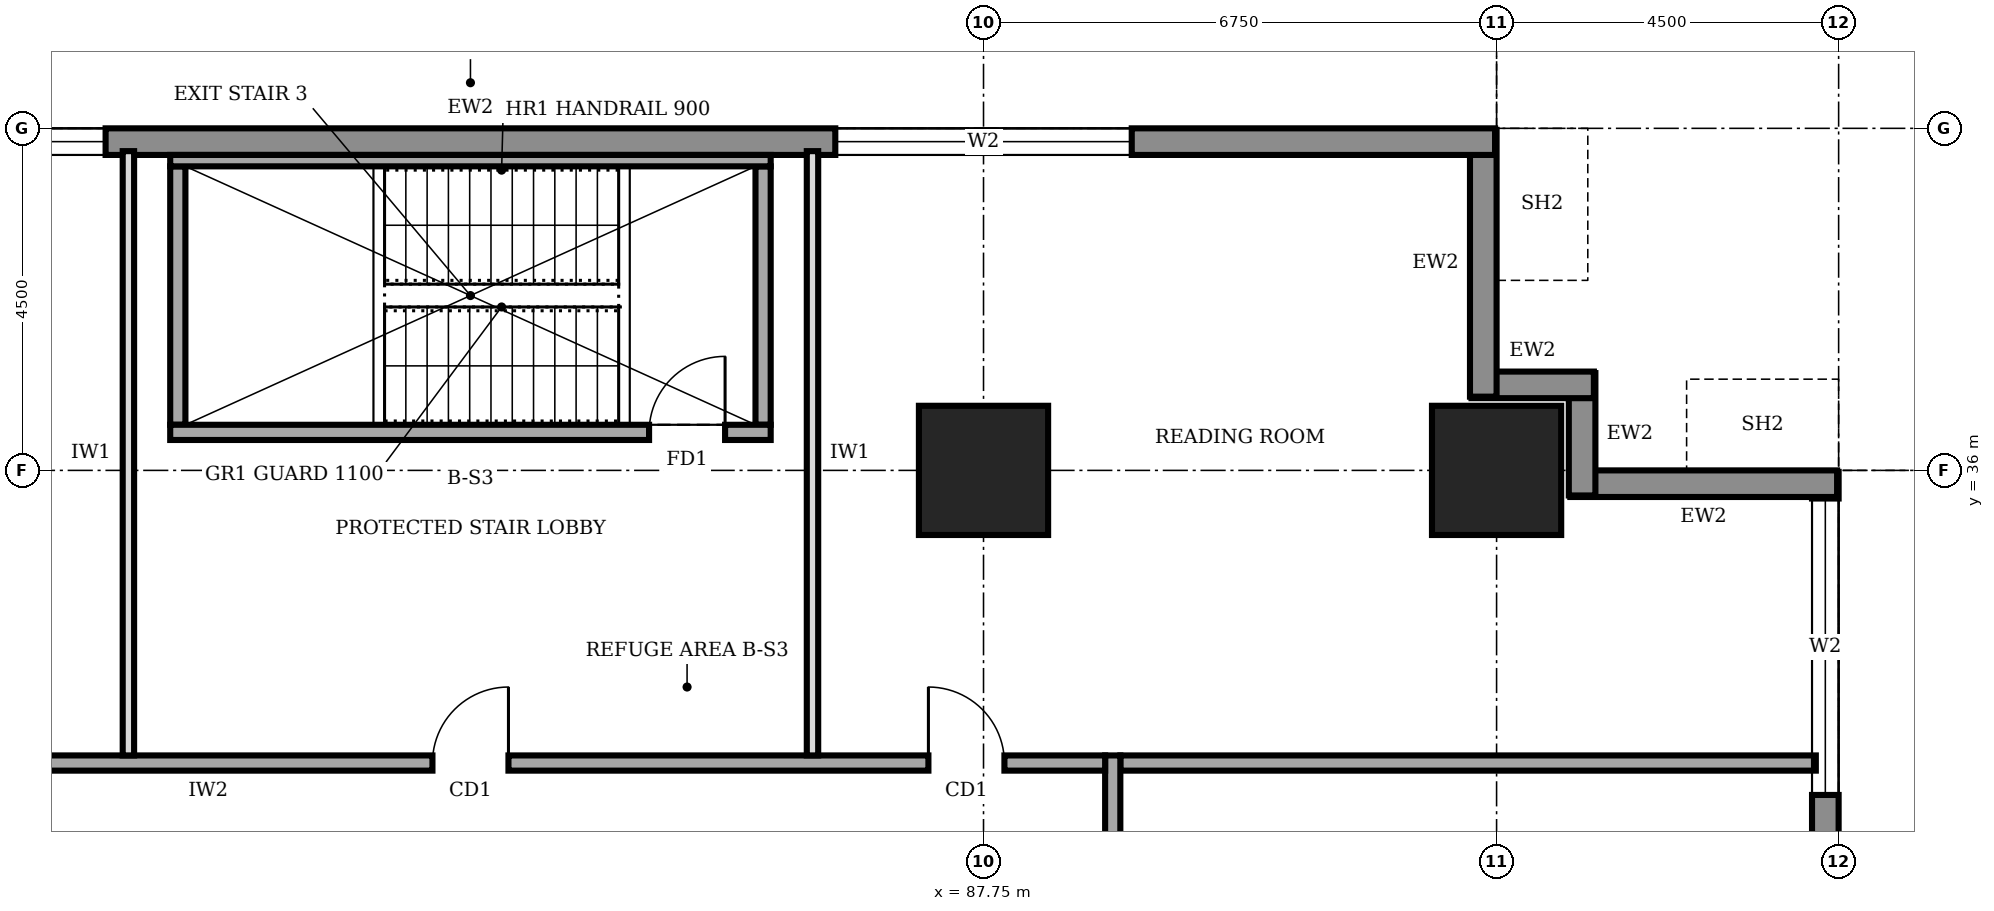
"""IFC4 building model, lengths in metres.
Left out: names, types, materials, properties, quantities, classifications, styles, units other than length and angle.
Written with IfcOpenShell. Run it as: python <this file> out.ifc"""

import sys

from ifc_helpers import new_model, si_unit, direction, frame, frame_2d, origin, origin_2d, place, context, subcontext, project, spatial, rectangle, extrude, element, fill, save


model = new_model("IFC4")
c1 = context("Model", 3, precision=1e-05, world=origin(), true_north=direction((0.0, 1.0)))
c2 = subcontext(c1, "Body", "Model", "MODEL_VIEW")
j1 = project(units=[si_unit("LENGTHUNIT", "METRE"), si_unit("PLANEANGLEUNIT", "RADIAN")], contexts=[c1])
p1 = place(None, origin())
s1 = spatial("IfcSite", under=j1, at=p1, CompositionType="ELEMENT")
p2 = place(p1, origin())
s2 = spatial("IfcBuilding", under=s1, at=p2, CompositionType="ELEMENT")
p3 = place(p2, frame((0.0, 0.0, 57.0)))
s3 = spatial("IfcBuildingStorey", under=s2, at=p3, CompositionType="ELEMENT", Elevation=57.0)
for number, where, z_axis, x_axis in (
    (1, (87.75, 36.0, 0.0), (0.0, 0.0, 1.0), (1.0, 0.0, 0.0)),
    (2, (94.5, 36.0, 0.0), (0.0, 0.0, 1.0), (1.0, 0.0, 0.0)),
):
    element("IfcColumn", number, at=place(p3, frame(where, z_axis=z_axis, x_axis=x_axis)), inside=s3, PredefinedType="COLUMN", context=c2, shape_type="SweptSolid", body=[
        extrude(rectangle(XDim=1.7, YDim=1.7, at=origin_2d()), origin(), (0.0, 0.0, 1.0), 4.0),
    ])
p4 = place(p3, frame((98.825, 4.52, 0.0), z_axis=(0.0, 0.0, 1.0), x_axis=(0.0, 1.0, 0.0)))
e3 = element("IfcWall", 3, at=p4, inside=s3, PredefinedType="STANDARD", context=c2, shape_type="SweptSolid", body=[
    extrude(rectangle(XDim=31.46, YDim=0.35, at=frame_2d((15.73, 0.0))), origin(), (0.0, 0.0, 1.0), 3.75),
])
p5 = place(p4, frame((4.78, 0.0, 0.6)))
e4 = element("IfcOpeningElement", 4, at=p5, cuts=e3, PredefinedType="OPENING", context=c2, shape_type="SweptSolid", body=[
    extrude(rectangle(XDim=3.9, YDim=2.6, at=frame_2d((1.95, 1.3))), frame((0.0, 0.185, 0.0), z_axis=(0.0, -1.0, 0.0), x_axis=(1.0, 0.0, 0.0)), (0.0, 0.0, 1.0), 0.37),
])
p6 = place(p4, frame((9.28, 0.0, 0.6)))
e5 = element("IfcOpeningElement", 5, at=p6, cuts=e3, PredefinedType="OPENING", context=c2, shape_type="SweptSolid", body=[
    extrude(rectangle(XDim=3.9, YDim=2.6, at=frame_2d((1.95, 1.3))), frame((0.0, 0.185, 0.0), z_axis=(0.0, -1.0, 0.0), x_axis=(1.0, 0.0, 0.0)), (0.0, 0.0, 1.0), 0.37),
])
p7 = place(p4, frame((13.78, 0.0, 0.6)))
e6 = element("IfcOpeningElement", 6, at=p7, cuts=e3, PredefinedType="OPENING", context=c2, shape_type="SweptSolid", body=[
    extrude(rectangle(XDim=3.9, YDim=2.6, at=frame_2d((1.95, 1.3))), frame((0.0, 0.185, 0.0), z_axis=(0.0, -1.0, 0.0), x_axis=(1.0, 0.0, 0.0)), (0.0, 0.0, 1.0), 0.37),
])
p8 = place(p4, frame((18.28, 0.0, 0.6)))
e7 = element("IfcOpeningElement", 7, at=p8, cuts=e3, PredefinedType="OPENING", context=c2, shape_type="SweptSolid", body=[
    extrude(rectangle(XDim=3.9, YDim=2.6, at=frame_2d((1.95, 1.3))), frame((0.0, 0.185, 0.0), z_axis=(0.0, -1.0, 0.0), x_axis=(1.0, 0.0, 0.0)), (0.0, 0.0, 1.0), 0.37),
])
p9 = place(p4, frame((22.78, 0.0, 0.6)))
e8 = element("IfcOpeningElement", 8, at=p9, cuts=e3, PredefinedType="OPENING", context=c2, shape_type="SweptSolid", body=[
    extrude(rectangle(XDim=3.9, YDim=2.6, at=frame_2d((1.95, 1.3))), frame((0.0, 0.185, 0.0), z_axis=(0.0, -1.0, 0.0), x_axis=(1.0, 0.0, 0.0)), (0.0, 0.0, 1.0), 0.37),
])
p10 = place(p4, frame((27.21, 0.0, 0.6)))
e9 = element("IfcOpeningElement", 9, at=p10, cuts=e3, PredefinedType="OPENING", context=c2, shape_type="SweptSolid", body=[
    extrude(rectangle(XDim=3.9, YDim=2.6, at=frame_2d((1.95, 1.3))), frame((0.0, 0.185, 0.0), z_axis=(0.0, -1.0, 0.0), x_axis=(1.0, 0.0, 0.0)), (0.0, 0.0, 1.0), 0.37),
])
p11 = place(p3, frame((98.98, 35.825, 0.0), z_axis=(0.0, 0.0, 1.0), x_axis=(-1.0, 0.0, 0.0)))
e10 = element("IfcWall", 10, at=p11, inside=s3, PredefinedType="STANDARD", context=c2, shape_type="SweptSolid", body=[
    extrude(rectangle(XDim=3.51, YDim=0.35, at=frame_2d((1.755, 0.0))), origin(), (0.0, 0.0, 1.0), 2.85),
])
for number, where, z_axis, x_axis in (
    (11, (95.625, 35.67, 0.0), (0.0, 0.0, 1.0), (0.0, 1.0, 0.0)),
    (12, (95.78, 37.125, 0.0), (0.0, 0.0, 1.0), (-1.0, 0.0, 0.0)),
):
    element("IfcWall", number, at=place(p3, frame(where, z_axis=z_axis, x_axis=x_axis)), inside=s3, PredefinedType="STANDARD", context=c2, shape_type="SweptSolid", body=[
        extrude(rectangle(XDim=1.61, YDim=0.35, at=frame_2d((0.805, 0.0))), origin(), (0.0, 0.0, 1.0), 3.75),
    ])
p12 = place(p3, frame((94.325, 36.97, 0.0), z_axis=(0.0, 0.0, 1.0), x_axis=(0.0, 1.0, 0.0)))
e13 = element("IfcWall", 13, at=p12, inside=s3, PredefinedType="STANDARD", context=c2, shape_type="SweptSolid", body=[
    extrude(rectangle(XDim=3.51, YDim=0.35, at=frame_2d((1.755, 0.0))), origin(), (0.0, 0.0, 1.0), 2.85),
])
p13 = place(p3, frame((94.48, 40.325, 0.0), z_axis=(0.0, 0.0, 1.0), x_axis=(-1.0, 0.0, 0.0)))
e14 = element("IfcWall", 14, at=p13, inside=s3, PredefinedType="STANDARD", context=c2, shape_type="SweptSolid", body=[
    extrude(rectangle(XDim=26.96, YDim=0.35, at=frame_2d((13.48, 0.0))), origin(), (0.0, 0.0, 1.0), 3.75),
])
p14 = place(p13, frame((22.71, 0.0, 0.6)))
e15 = element("IfcOpeningElement", 15, at=p14, cuts=e14, PredefinedType="OPENING", context=c2, shape_type="SweptSolid", body=[
    extrude(rectangle(XDim=3.9, YDim=2.6, at=frame_2d((1.95, 1.3))), frame((0.0, 0.185, 0.0), z_axis=(0.0, -1.0, 0.0), x_axis=(1.0, 0.0, 0.0)), (0.0, 0.0, 1.0), 0.37),
])
p15 = place(p13, frame((18.28, 0.0, 0.6)))
e16 = element("IfcOpeningElement", 16, at=p15, cuts=e14, PredefinedType="OPENING", context=c2, shape_type="SweptSolid", body=[
    extrude(rectangle(XDim=3.9, YDim=2.6, at=frame_2d((1.95, 1.3))), frame((0.0, 0.185, 0.0), z_axis=(0.0, -1.0, 0.0), x_axis=(1.0, 0.0, 0.0)), (0.0, 0.0, 1.0), 0.37),
])
p16 = place(p13, frame((4.78, 0.0, 0.6)))
e17 = element("IfcOpeningElement", 17, at=p16, cuts=e14, PredefinedType="OPENING", context=c2, shape_type="SweptSolid", body=[
    extrude(rectangle(XDim=3.9, YDim=2.6, at=frame_2d((1.95, 1.3))), frame((0.0, 0.185, 0.0), z_axis=(0.0, -1.0, 0.0), x_axis=(1.0, 0.0, 0.0)), (0.0, 0.0, 1.0), 0.37),
])
p17 = place(p3, frame((89.45, 9.2, 0.0), z_axis=(0.0, 0.0, 1.0), x_axis=(0.0, 1.0, 0.0)))
e18 = element("IfcWall", 18, at=p17, inside=s3, PredefinedType="SOLIDWALL", context=c2, shape_type="SweptSolid", body=[
    extrude(rectangle(XDim=23.05, YDim=0.2, at=frame_2d((11.525, 0.0))), origin(), (0.0, 0.0, 1.0), 3.75),
])
p18 = place(p17, frame((1.55, 0.0, 0.0)))
e19 = element("IfcOpeningElement", 19, at=p18, cuts=e18, PredefinedType="OPENING", context=c2, shape_type="SweptSolid", body=[
    extrude(rectangle(XDim=1.0, YDim=2.1, at=frame_2d((0.5, 1.05))), frame((0.0, 0.11, 0.0), z_axis=(0.0, -1.0, 0.0), x_axis=(1.0, 0.0, 0.0)), (0.0, 0.0, 1.0), 0.22),
])
p19 = place(p17, frame((5.75, 0.0, 0.0)))
e20 = element("IfcOpeningElement", 20, at=p19, cuts=e18, PredefinedType="OPENING", context=c2, shape_type="SweptSolid", body=[
    extrude(rectangle(XDim=0.9, YDim=2.1, at=frame_2d((0.45, 1.05))), frame((0.0, 0.11, 0.0), z_axis=(0.0, -1.0, 0.0), x_axis=(1.0, 0.0, 0.0)), (0.0, 0.0, 1.0), 0.22),
])
p20 = place(p17, frame((8.75, 0.0, 0.0)))
e21 = element("IfcOpeningElement", 21, at=p20, cuts=e18, PredefinedType="OPENING", context=c2, shape_type="SweptSolid", body=[
    extrude(rectangle(XDim=0.9, YDim=2.1, at=frame_2d((0.45, 1.05))), frame((0.0, 0.11, 0.0), z_axis=(0.0, -1.0, 0.0), x_axis=(1.0, 0.0, 0.0)), (0.0, 0.0, 1.0), 0.22),
])
p21 = place(p17, frame((13.6, 0.0, 0.0)))
e22 = element("IfcOpeningElement", 22, at=p21, cuts=e18, PredefinedType="OPENING", context=c2, shape_type="SweptSolid", body=[
    extrude(rectangle(XDim=0.9, YDim=2.1, at=frame_2d((0.45, 1.05))), frame((0.0, 0.11, 0.0), z_axis=(0.0, -1.0, 0.0), x_axis=(1.0, 0.0, 0.0)), (0.0, 0.0, 1.0), 0.22),
])
p22 = place(p17, frame((16.3, 0.0, 0.0)))
e23 = element("IfcOpeningElement", 23, at=p22, cuts=e18, PredefinedType="OPENING", context=c2, shape_type="SweptSolid", body=[
    extrude(rectangle(XDim=1.0, YDim=2.1, at=frame_2d((0.5, 1.05))), frame((0.0, 0.11, 0.0), z_axis=(0.0, -1.0, 0.0), x_axis=(1.0, 0.0, 0.0)), (0.0, 0.0, 1.0), 0.22),
])
p23 = place(p17, frame((10.8, 0.0, 0.0)))
e24 = element("IfcOpeningElement", 24, at=p23, cuts=e18, PredefinedType="OPENING", context=c2, shape_type="SweptSolid", body=[
    extrude(rectangle(XDim=1.0, YDim=2.1, at=frame_2d((0.5, 1.05))), frame((0.0, 0.11, 0.0), z_axis=(0.0, -1.0, 0.0), x_axis=(1.0, 0.0, 0.0)), (0.0, 0.0, 1.0), 0.22),
])
p24 = place(p17, frame((19.925, 0.0, 0.0)))
e25 = element("IfcOpeningElement", 25, at=p24, cuts=e18, PredefinedType="OPENING", context=c2, shape_type="SweptSolid", body=[
    extrude(rectangle(XDim=1.0, YDim=2.1, at=frame_2d((0.5, 1.05))), frame((0.0, 0.11, 0.0), z_axis=(0.0, -1.0, 0.0), x_axis=(1.0, 0.0, 0.0)), (0.0, 0.0, 1.0), 0.22),
])
p25 = place(p3, frame((89.35, 32.15, 0.0), z_axis=(0.0, 0.0, 1.0), x_axis=(-1.0, 0.0, 0.0)))
e26 = element("IfcWall", 26, at=p25, inside=s3, PredefinedType="SOLIDWALL", context=c2, shape_type="SweptSolid", body=[
    extrude(rectangle(XDim=17.65, YDim=0.2, at=frame_2d((8.825, 0.0))), origin(), (0.0, 0.0, 1.0), 3.75),
])
p26 = place(p25, frame((14.75, 0.0, 0.0)))
e27 = element("IfcOpeningElement", 27, at=p26, cuts=e26, PredefinedType="OPENING", context=c2, shape_type="SweptSolid", body=[
    extrude(rectangle(XDim=1.0, YDim=2.1, at=frame_2d((0.5, 1.05))), frame((0.0, 0.11, 0.0), z_axis=(0.0, -1.0, 0.0), x_axis=(1.0, 0.0, 0.0)), (0.0, 0.0, 1.0), 0.22),
])
p27 = place(p25, frame((7.85, 0.0, 0.0)))
e28 = element("IfcOpeningElement", 28, at=p27, cuts=e26, PredefinedType="OPENING", context=c2, shape_type="SweptSolid", body=[
    extrude(rectangle(XDim=1.0, YDim=2.1, at=frame_2d((0.5, 1.05))), frame((0.0, 0.11, 0.0), z_axis=(0.0, -1.0, 0.0), x_axis=(1.0, 0.0, 0.0)), (0.0, 0.0, 1.0), 0.22),
])
p28 = place(p25, frame((1.325, 0.0, 0.0)))
e29 = element("IfcOpeningElement", 29, at=p28, cuts=e26, PredefinedType="OPENING", context=c2, shape_type="SweptSolid", body=[
    extrude(rectangle(XDim=1.0, YDim=2.1, at=frame_2d((0.5, 1.05))), frame((0.0, 0.11, 0.0), z_axis=(0.0, -1.0, 0.0), x_axis=(1.0, 0.0, 0.0)), (0.0, 0.0, 1.0), 0.22),
])
p29 = place(p3, frame((89.55, 32.15, 0.0), z_axis=(0.0, 0.0, 1.0), x_axis=(1.0, 0.0, 0.0)))
e30 = element("IfcWall", 30, at=p29, inside=s3, PredefinedType="SOLIDWALL", context=c2, shape_type="SweptSolid", body=[
    extrude(rectangle(XDim=9.15, YDim=0.2, at=frame_2d((4.575, 0.0))), origin(), (0.0, 0.0, 1.0), 3.75),
])
for number, where, z_axis, x_axis in (
    (31, (76.5, 32.25, 0.0), (0.0, 0.0, 1.0), (0.0, 1.0, 0.0)),
    (32, (85.5, 32.25, 0.0), (0.0, 0.0, 1.0), (0.0, 1.0, 0.0)),
):
    element("IfcWall", number, at=place(p3, frame(where, z_axis=z_axis, x_axis=x_axis)), inside=s3, PredefinedType="PARTITIONING", context=c2, shape_type="SweptSolid", body=[
        extrude(rectangle(XDim=7.95, YDim=0.15, at=frame_2d((3.975, 0.0))), origin(), (0.0, 0.0, 1.0), 3.75),
    ])
p30 = place(p3, frame((77.05, 36.5, 0.0), z_axis=(0.0, 0.0, 1.0), x_axis=(1.0, 0.0, 0.0)))
e33 = element("IfcWall", 33, at=p30, inside=s3, PredefinedType="SOLIDWALL", context=c2, shape_type="SweptSolid", body=[
    extrude(rectangle(XDim=7.9, YDim=0.2, at=frame_2d((3.95, 0.0))), origin(), (0.0, 0.0, 1.0), 3.75),
])
p31 = place(p30, frame((6.3, 0.0, 0.0)))
e34 = element("IfcOpeningElement", 34, at=p31, cuts=e33, PredefinedType="OPENING", context=c2, shape_type="SweptSolid", body=[
    extrude(rectangle(XDim=1.0, YDim=2.1, at=frame_2d((0.5, 1.05))), frame((0.0, 0.11, 0.0), z_axis=(0.0, -1.0, 0.0), x_axis=(1.0, 0.0, 0.0)), (0.0, 0.0, 1.0), 0.22),
])
p32 = place(p3, frame((77.05, 40.075, 0.0), z_axis=(0.0, 0.0, 1.0), x_axis=(1.0, 0.0, 0.0)))
e35 = element("IfcWall", 35, at=p32, inside=s3, PredefinedType="SOLIDWALL", context=c2, shape_type="SweptSolid", body=[
    extrude(rectangle(XDim=7.9, YDim=0.15, at=frame_2d((3.95, 0.0))), origin(), (0.0, 0.0, 1.0), 3.75),
])
for number, where, z_axis, x_axis in (
    (36, (77.15, 36.6, 0.0), (0.0, 0.0, 1.0), (0.0, 1.0, 0.0)),
    (37, (84.85, 36.6, 0.0), (0.0, 0.0, 1.0), (0.0, 1.0, 0.0)),
):
    element("IfcWall", number, at=place(p3, frame(where, z_axis=z_axis, x_axis=x_axis)), inside=s3, PredefinedType="SOLIDWALL", context=c2, shape_type="SweptSolid", body=[
        extrude(rectangle(XDim=3.4, YDim=0.2, at=frame_2d((1.7, 0.0))), origin(), (0.0, 0.0, 1.0), 3.75),
    ])
p33 = place(p10, origin())
e38 = element("IfcWindow", 38, at=p33, inside=s3, PartitioningType="SINGLE_PANEL", PredefinedType="WINDOW", context=c2, shape_type="SweptSolid", body=[
    extrude(rectangle(XDim=3.9, YDim=2.6, at=frame_2d((1.95, 1.3))), frame((0.0, 0.03, 0.0), z_axis=(0.0, -1.0, 0.0), x_axis=(1.0, 0.0, 0.0)), (0.0, 0.0, 1.0), 0.06),
])
fill(e9, e38)
p34 = place(p15, origin())
e39 = element("IfcWindow", 39, at=p34, inside=s3, PartitioningType="SINGLE_PANEL", PredefinedType="WINDOW", context=c2, shape_type="SweptSolid", body=[
    extrude(rectangle(XDim=3.9, YDim=2.6, at=frame_2d((1.95, 1.3))), frame((0.0, 0.03, 0.0), z_axis=(0.0, -1.0, 0.0), x_axis=(1.0, 0.0, 0.0)), (0.0, 0.0, 1.0), 0.06),
])
fill(e16, e39)
p35 = place(p16, origin())
e40 = element("IfcWindow", 40, at=p35, inside=s3, PartitioningType="SINGLE_PANEL", PredefinedType="WINDOW", context=c2, shape_type="SweptSolid", body=[
    extrude(rectangle(XDim=3.9, YDim=2.6, at=frame_2d((1.95, 1.3))), frame((0.0, 0.03, 0.0), z_axis=(0.0, -1.0, 0.0), x_axis=(1.0, 0.0, 0.0)), (0.0, 0.0, 1.0), 0.06),
])
fill(e17, e40)
p36 = place(p27, frame((1.0, 0.0, 0.0), z_axis=(0.0, 0.0, 1.0), x_axis=(-1.0, 0.0, 0.0)))
e41 = element("IfcDoor", 41, at=p36, inside=s3, OperationType="SINGLE_SWING_RIGHT", PredefinedType="DOOR", context=c2, shape_type="SweptSolid", body=[
    extrude(rectangle(XDim=1.0, YDim=2.1, at=frame_2d((0.5, 1.05))), frame((0.0, 0.025, 0.0), z_axis=(0.0, -1.0, 0.0), x_axis=(1.0, 0.0, 0.0)), (0.0, 0.0, 1.0), 0.05),
])
fill(e28, e41)
p37 = place(p28, frame((1.0, 0.0, 0.0), z_axis=(0.0, 0.0, 1.0), x_axis=(-1.0, 0.0, 0.0)))
e42 = element("IfcDoor", 42, at=p37, inside=s3, OperationType="SINGLE_SWING_LEFT", PredefinedType="DOOR", context=c2, shape_type="SweptSolid", body=[
    extrude(rectangle(XDim=1.0, YDim=2.1, at=frame_2d((0.5, 1.05))), frame((0.0, 0.025, 0.0), z_axis=(0.0, -1.0, 0.0), x_axis=(1.0, 0.0, 0.0)), (0.0, 0.0, 1.0), 0.05),
])
fill(e29, e42)
p38 = place(p31, origin())
e43 = element("IfcDoor", 43, at=p38, inside=s3, OperationType="SINGLE_SWING_RIGHT", PredefinedType="DOOR", context=c2, shape_type="SweptSolid", body=[
    extrude(rectangle(XDim=1.0, YDim=2.1, at=frame_2d((0.5, 1.05))), frame((0.0, 0.025, 0.0), z_axis=(0.0, -1.0, 0.0), x_axis=(1.0, 0.0, 0.0)), (0.0, 0.0, 1.0), 0.05),
])
fill(e34, e43)
save(model, sys.argv[1])
